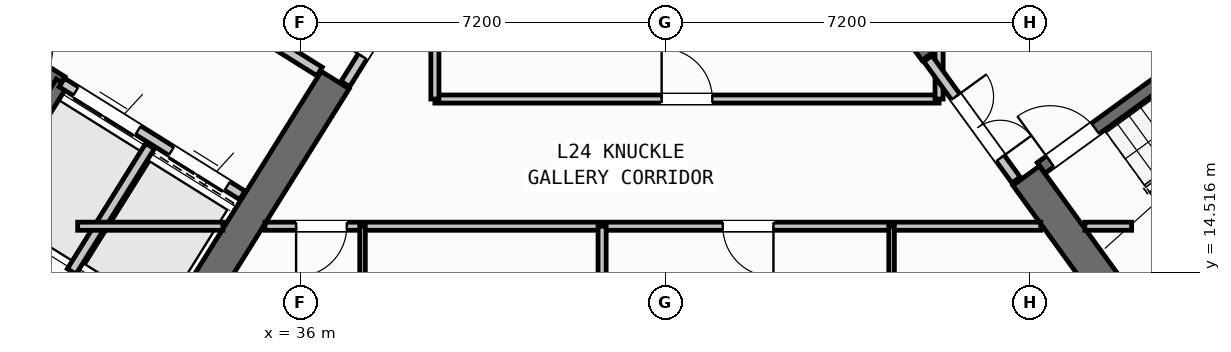
"""IFC4 building model, lengths in metres.
Left out: names, types, materials, properties, quantities, classifications, styles, units other than length and angle.
Written with IfcOpenShell. Run it as: python <this file> out.ifc"""

import sys

from ifc_helpers import new_model, si_unit, direction, frame, frame_2d, origin, place, context, subcontext, project, spatial, rectangle, extrude, source, transform, mapped, element, fill, save


model = new_model("IFC4")
c1 = context("Model", 3, precision=1e-05, world=origin(), true_north=direction((0.0, 1.0)))
c2 = subcontext(c1, "Body", "Model", "MODEL_VIEW")
j1 = project(units=[si_unit("LENGTHUNIT", "METRE"), si_unit("PLANEANGLEUNIT", "RADIAN")], contexts=[c1])
p1 = place(None, origin())
s1 = spatial("IfcSite", under=j1, at=p1, CompositionType="ELEMENT")
p2 = place(p1, origin())
s2 = spatial("IfcBuilding", under=s1, at=p2, CompositionType="ELEMENT")
p3 = place(p2, frame((0.0, 0.0, 97.2)))
s3 = spatial("IfcBuildingStorey", under=s2, at=p3, CompositionType="ELEMENT", Elevation=97.2)
p4 = place(p3, frame((33.409, 12.45, 0.0), z_axis=(0.0, 0.0, 1.0), x_axis=(-0.848051132073, 0.529914405721, 0.0)))
e1 = element("IfcWall", 1, at=p4, inside=s3, PredefinedType="SHEAR", context=c2, shape_type="SweptSolid", body=[
    extrude(rectangle(XDim=13.24, YDim=0.65, at=frame_2d((6.62, 0.0))), origin(), (0.0, 0.0, 1.0), 3.32),
])
p5 = place(p3, frame((36.683, 18.304, 0.0), z_axis=(0.0, 0.0, 1.0), x_axis=(-0.529899109053, -0.848060690178, 0.0)))
e2 = element("IfcWall", 2, at=p5, inside=s3, PredefinedType="SHEAR", context=c2, shape_type="SweptSolid", body=[
    extrude(rectangle(XDim=6.375, YDim=0.65, at=frame_2d((3.188, 0.0))), origin(), (0.0, 0.0, 1.0), 3.32),
])
p6 = place(p3, frame((52.318, 13.11, 0.0), z_axis=(0.0, 0.0, 1.0), x_axis=(0.809019445368, 0.587781878776, 0.0)))
e3 = element("IfcWall", 3, at=p6, inside=s3, PredefinedType="SHEAR", context=c2, shape_type="SweptSolid", body=[
    extrude(rectangle(XDim=12.44, YDim=0.65, at=frame_2d((6.22, 0.0))), origin(), (0.0, 0.0, 1.0), 3.32),
])
p7 = place(p3, frame((52.39, 13.564, 0.0), z_axis=(0.0, 0.0, 1.0), x_axis=(-0.58779688989, 0.809008539037, 0.0)))
e4 = element("IfcWall", 4, at=p7, inside=s3, PredefinedType="SHEAR", context=c2, shape_type="SweptSolid", body=[
    extrude(rectangle(XDim=3.525, YDim=0.65, at=frame_2d((1.763, 0.0))), origin(), (0.0, 0.0, 1.0), 3.32),
])
p8 = place(p3, frame((48.526, 18.884, 0.0), z_axis=(0.0, 0.0, 1.0), x_axis=(-0.58777996584, 0.809020835181, 0.0)))
e5 = element("IfcWall", 5, at=p8, inside=s3, PredefinedType="SHEAR", context=c2, shape_type="SweptSolid", body=[
    extrude(rectangle(XDim=6.375, YDim=0.65, at=frame_2d((3.188, 0.0))), origin(), (0.0, 0.0, 1.0), 3.32),
])
p9 = place(p3, frame((31.76, 12.183, 0.0), z_axis=(0.0, 0.0, 1.0), x_axis=(-0.848047074256, 0.529920899612, 0.0)))
e6 = element("IfcWall", 6, at=p9, inside=s3, PredefinedType="STANDARD", context=c2, shape_type="SweptSolid", body=[
    extrude(rectangle(XDim=30.652, YDim=0.32, at=frame_2d((15.326, 0.0))), origin(), (0.0, 0.0, 1.0), 3.32),
])
p10 = place(p9, frame((15.153, 0.0, 0.0)))
e7 = element("IfcOpeningElement", 7, at=p10, cuts=e6, PredefinedType="OPENING", context=c2, shape_type="SweptSolid", body=[
    extrude(rectangle(XDim=1.2, YDim=2.15, at=frame_2d((0.6, 1.075))), frame((0.0, 0.17, 0.0), z_axis=(0.0, -1.0, 0.0), x_axis=(1.0, 0.0, 0.0)), (0.0, 0.0, 1.0), 0.34),
])
p11 = place(p9, frame((2.002, 0.0, 0.8)))
e8 = element("IfcOpeningElement", 8, at=p11, cuts=e6, PredefinedType="OPENING", context=c2, shape_type="SweptSolid", body=[
    extrude(rectangle(XDim=2.1, YDim=1.55, at=frame_2d((1.05, 0.775))), frame((0.0, 0.17, 0.0), z_axis=(0.0, -1.0, 0.0), x_axis=(1.0, 0.0, 0.0)), (0.0, 0.0, 1.0), 0.34),
])
p12 = place(p9, frame((7.206, 0.0, 0.8)))
e9 = element("IfcOpeningElement", 9, at=p12, cuts=e6, PredefinedType="OPENING", context=c2, shape_type="SweptSolid", body=[
    extrude(rectangle(XDim=2.1, YDim=1.55, at=frame_2d((1.05, 0.775))), frame((0.0, 0.17, 0.0), z_axis=(0.0, -1.0, 0.0), x_axis=(1.0, 0.0, 0.0)), (0.0, 0.0, 1.0), 0.34),
])
p13 = place(p9, frame((12.648, 0.0, 1.0)))
e10 = element("IfcOpeningElement", 10, at=p13, cuts=e6, PredefinedType="OPENING", context=c2, shape_type="SweptSolid", body=[
    extrude(rectangle(XDim=0.9, YDim=1.25, at=frame_2d((0.45, 0.625))), frame((0.0, 0.17, 0.0), z_axis=(0.0, -1.0, 0.0), x_axis=(1.0, 0.0, 0.0)), (0.0, 0.0, 1.0), 0.34),
])
p14 = place(p9, frame((27.974, 0.0, 0.95)))
e11 = element("IfcOpeningElement", 11, at=p14, cuts=e6, PredefinedType="OPENING", context=c2, shape_type="SweptSolid", body=[
    extrude(rectangle(XDim=1.2, YDim=1.4, at=frame_2d((0.6, 0.7))), frame((0.0, 0.17, 0.0), z_axis=(0.0, -1.0, 0.0), x_axis=(1.0, 0.0, 0.0)), (0.0, 0.0, 1.0), 0.34),
])
p15 = place(p9, frame((18.347, 0.0, 1.0)))
e12 = element("IfcOpeningElement", 12, at=p15, cuts=e6, PredefinedType="OPENING", context=c2, shape_type="SweptSolid", body=[
    extrude(rectangle(XDim=0.9, YDim=1.25, at=frame_2d((0.45, 0.625))), frame((0.0, 0.17, 0.0), z_axis=(0.0, -1.0, 0.0), x_axis=(1.0, 0.0, 0.0)), (0.0, 0.0, 1.0), 0.34),
])
p16 = place(p9, frame((20.931, 0.0, 1.0)))
e13 = element("IfcOpeningElement", 13, at=p16, cuts=e6, PredefinedType="OPENING", context=c2, shape_type="SweptSolid", body=[
    extrude(rectangle(XDim=0.65, YDim=1.15, at=frame_2d((0.325, 0.575))), frame((0.0, 0.17, 0.0), z_axis=(0.0, -1.0, 0.0), x_axis=(1.0, 0.0, 0.0)), (0.0, 0.0, 1.0), 0.34),
])
p17 = place(p9, frame((22.938, 0.0, 1.0)))
e14 = element("IfcOpeningElement", 14, at=p17, cuts=e6, PredefinedType="OPENING", context=c2, shape_type="SweptSolid", body=[
    extrude(rectangle(XDim=0.9, YDim=1.25, at=frame_2d((0.45, 0.625))), frame((0.0, 0.17, 0.0), z_axis=(0.0, -1.0, 0.0), x_axis=(1.0, 0.0, 0.0)), (0.0, 0.0, 1.0), 0.34),
])
p18 = place(p9, frame((25.069, 0.0, 1.0)))
e15 = element("IfcOpeningElement", 15, at=p18, cuts=e6, PredefinedType="OPENING", context=c2, shape_type="SweptSolid", body=[
    extrude(rectangle(XDim=0.9, YDim=1.25, at=frame_2d((0.45, 0.625))), frame((0.0, 0.17, 0.0), z_axis=(0.0, -1.0, 0.0), x_axis=(1.0, 0.0, 0.0)), (0.0, 0.0, 1.0), 0.34),
])
p19 = place(p3, frame((31.28, 18.261, 0.0), z_axis=(0.0, 0.0, 1.0), x_axis=(-0.848051618787, 0.529913626805, 0.0)))
e16 = element("IfcWall", 16, at=p19, inside=s3, PredefinedType="SHEAR", context=c2, shape_type="SweptSolid", body=[
    extrude(rectangle(XDim=7.46, YDim=0.26, at=frame_2d((3.73, 0.0))), origin(), (0.0, 0.0, 1.0), 3.32),
])
p20 = place(p19, frame((0.36, 0.0, 0.0)))
e17 = element("IfcOpeningElement", 17, at=p20, cuts=e16, PredefinedType="OPENING", context=c2, shape_type="SweptSolid", body=[
    extrude(rectangle(XDim=0.86, YDim=2.05, at=frame_2d((0.43, 1.025))), frame((0.0, 0.14, 0.0), z_axis=(0.0, -1.0, 0.0), x_axis=(1.0, 0.0, 0.0)), (0.0, 0.0, 1.0), 0.28),
])
p21 = place(p3, frame((31.288, 18.256, 0.0), z_axis=(0.0, 0.0, 1.0), x_axis=(-0.529943379326, -0.848033026897, 0.0)))
e18 = element("IfcWall", 18, at=p21, inside=s3, PredefinedType="SHEAR", context=c2, shape_type="SweptSolid", body=[
    extrude(rectangle(XDim=3.16, YDim=0.26, at=frame_2d((1.58, 0.0))), origin(), (0.0, 0.0, 1.0), 3.32),
])
p22 = place(p3, frame((34.848, 16.031, 0.0), z_axis=(0.0, 0.0, 1.0), x_axis=(-0.848044042236, 0.529925751807, 0.0)))
e19 = element("IfcWall", 19, at=p22, inside=s3, PredefinedType="STANDARD", context=c2, shape_type="SweptSolid", body=[
    extrude(rectangle(XDim=4.198, YDim=0.2, at=frame_2d((2.099, 0.0))), origin(), (0.0, 0.0, 1.0), 3.31),
])
p23 = place(p22, frame((0.348, 0.0, 0.0)))
e20 = element("IfcOpeningElement", 20, at=p23, cuts=e19, PredefinedType="OPENING", context=c2, shape_type="SweptSolid", body=[
    extrude(rectangle(XDim=1.3, YDim=2.2, at=frame_2d((0.65, 1.1))), frame((0.0, 0.11, 0.0), z_axis=(0.0, -1.0, 0.0), x_axis=(1.0, 0.0, 0.0)), (0.0, 0.0, 1.0), 0.22),
])
p24 = place(p22, frame((2.423, 0.0, 0.0)))
e21 = element("IfcOpeningElement", 21, at=p24, cuts=e19, PredefinedType="OPENING", context=c2, shape_type="SweptSolid", body=[
    extrude(rectangle(XDim=1.45, YDim=2.25, at=frame_2d((0.725, 1.125))), frame((0.0, 0.11, 0.0), z_axis=(0.0, -1.0, 0.0), x_axis=(1.0, 0.0, 0.0)), (0.0, 0.0, 1.0), 0.22),
])
p25 = place(p3, frame((36.374, 18.474, 0.0), z_axis=(0.0, 0.0, 1.0), x_axis=(-0.848051071577, 0.529914502535, 0.0)))
e22 = element("IfcWall", 22, at=p25, inside=s3, PredefinedType="STANDARD", context=c2, shape_type="SweptSolid", body=[
    extrude(rectangle(XDim=5.718, YDim=0.2, at=frame_2d((2.859, 0.0))), origin(), (0.0, 0.0, 1.0), 3.31),
])
p26 = place(p25, frame((2.498, 0.0, 0.0)))
e23 = element("IfcOpeningElement", 23, at=p26, cuts=e22, PredefinedType="OPENING", context=c2, shape_type="SweptSolid", body=[
    extrude(rectangle(XDim=1.15, YDim=2.1, at=frame_2d((0.575, 1.05))), frame((0.0, 0.11, 0.0), z_axis=(0.0, -1.0, 0.0), x_axis=(1.0, 0.0, 0.0)), (0.0, 0.0, 1.0), 0.22),
])
p27 = place(p3, frame((33.029, 17.003, 0.0), z_axis=(0.0, 0.0, 1.0), x_axis=(-0.529916267533, -0.848049968695, 0.0)))
e24 = element("IfcWall", 24, at=p27, inside=s3, PredefinedType="STANDARD", context=c2, shape_type="SweptSolid", body=[
    extrude(rectangle(XDim=2.92, YDim=0.2, at=frame_2d((1.46, 0.0))), origin(), (0.0, 0.0, 1.0), 3.31),
])
p28 = place(p3, frame((52.472, 14.013, 0.0), z_axis=(0.0, 0.0, 1.0), x_axis=(0.809028366311, 0.587769599847, 0.0)))
e25 = element("IfcWall", 25, at=p28, inside=s3, PredefinedType="SHEAR", context=c2, shape_type="SweptSolid", body=[
    extrude(rectangle(XDim=7.33, YDim=0.26, at=frame_2d((3.665, 0.0))), origin(), (0.0, 0.0, 1.0), 3.32),
])
p29 = place(p3, frame((50.615, 16.57, 0.0), z_axis=(0.0, 0.0, 1.0), x_axis=(0.809028366311, 0.587769599847, 0.0)))
e26 = element("IfcWall", 26, at=p29, inside=s3, PredefinedType="SHEAR", context=c2, shape_type="SweptSolid", body=[
    extrude(rectangle(XDim=7.33, YDim=0.26, at=frame_2d((3.665, 0.0))), origin(), (0.0, 0.0, 1.0), 3.32),
])
p30 = place(p29, frame((0.22, 0.0, 0.0)))
e27 = element("IfcOpeningElement", 27, at=p30, cuts=e26, PredefinedType="OPENING", context=c2, shape_type="SweptSolid", body=[
    extrude(rectangle(XDim=1.1, YDim=2.1, at=frame_2d((0.55, 1.05))), frame((0.0, 0.14, 0.0), z_axis=(0.0, -1.0, 0.0), x_axis=(1.0, 0.0, 0.0)), (0.0, 0.0, 1.0), 0.28),
])
p31 = place(p3, frame((38.451, 20.737, 0.0), z_axis=(0.0, 0.0, 1.0), x_axis=(-0.529924799939, -0.848044637038, 0.0)))
e28 = element("IfcWall", 28, at=p31, inside=s3, PredefinedType="STANDARD", context=c2, shape_type="SweptSolid", body=[
    extrude(rectangle(XDim=2.96, YDim=0.2, at=frame_2d((1.48, 0.0))), origin(), (0.0, 0.0, 1.0), 3.31),
])
p32 = place(p31, frame((1.46, 0.0, 0.0)))
e29 = element("IfcOpeningElement", 29, at=p32, cuts=e28, PredefinedType="OPENING", context=c2, shape_type="SweptSolid", body=[
    extrude(rectangle(XDim=0.86, YDim=2.05, at=frame_2d((0.43, 1.025))), frame((0.0, 0.11, 0.0), z_axis=(0.0, -1.0, 0.0), x_axis=(1.0, 0.0, 0.0)), (0.0, 0.0, 1.0), 0.22),
])
p33 = place(p3, frame((31.6, 15.42, 0.0), z_axis=(0.0, 0.0, 1.0), x_axis=(1.0, 0.0, 0.0)))
e30 = element("IfcWall", 30, at=p33, inside=s3, PredefinedType="PARTITIONING", context=c2, shape_type="SweptSolid", body=[
    extrude(rectangle(XDim=2.866, YDim=0.16, at=frame_2d((1.433, 0.0))), origin(), (0.0, 0.0, 1.0), 3.31),
])
p34 = place(p3, frame((35.296, 15.42, 0.0), z_axis=(0.0, 0.0, 1.0), x_axis=(1.0, 0.0, 0.0)))
e31 = element("IfcWall", 31, at=p34, inside=s3, PredefinedType="PARTITIONING", context=c2, shape_type="SweptSolid", body=[
    extrude(rectangle(XDim=15.311, YDim=0.16, at=frame_2d((7.655, 0.0))), origin(), (0.0, 0.0, 1.0), 3.31),
])
p35 = place(p34, frame((0.615, 0.0, 0.0)))
e32 = element("IfcOpeningElement", 32, at=p35, cuts=e31, PredefinedType="OPENING", context=c2, shape_type="SweptSolid", body=[
    extrude(rectangle(XDim=1.0, YDim=2.1, at=frame_2d((0.5, 1.05))), frame((0.0, 0.09, 0.0), z_axis=(0.0, -1.0, 0.0), x_axis=(1.0, 0.0, 0.0)), (0.0, 0.0, 1.0), 0.18),
])
p36 = place(p34, frame((9.035, 0.0, 0.0)))
e33 = element("IfcOpeningElement", 33, at=p36, cuts=e31, PredefinedType="OPENING", context=c2, shape_type="SweptSolid", body=[
    extrude(rectangle(XDim=1.0, YDim=2.1, at=frame_2d((0.5, 1.05))), frame((0.0, 0.09, 0.0), z_axis=(0.0, -1.0, 0.0), x_axis=(1.0, 0.0, 0.0)), (0.0, 0.0, 1.0), 0.18),
])
p37 = place(p3, frame((51.477, 15.42, 0.0), z_axis=(0.0, 0.0, 1.0), x_axis=(1.0, 0.0, 0.0)))
e34 = element("IfcWall", 34, at=p37, inside=s3, PredefinedType="PARTITIONING", context=c2, shape_type="SweptSolid", body=[
    extrude(rectangle(XDim=0.923, YDim=0.16, at=frame_2d((0.461, 0.0))), origin(), (0.0, 0.0, 1.0), 3.31),
])
p38 = place(p3, frame((38.65, 17.93, 0.0), z_axis=(0.0, 0.0, 1.0), x_axis=(1.0, 0.0, 0.0)))
e35 = element("IfcWall", 35, at=p38, inside=s3, PredefinedType="PARTITIONING", context=c2, shape_type="SweptSolid", body=[
    extrude(rectangle(XDim=9.95, YDim=0.16, at=frame_2d((4.975, 0.0))), origin(), (0.0, 0.0, 1.0), 3.31),
])
p39 = place(p38, frame((4.475, 0.0, 0.0)))
e36 = element("IfcOpeningElement", 36, at=p39, cuts=e35, PredefinedType="OPENING", context=c2, shape_type="SweptSolid", body=[
    extrude(rectangle(XDim=1.0, YDim=2.1, at=frame_2d((0.5, 1.05))), frame((0.0, 0.09, 0.0), z_axis=(0.0, -1.0, 0.0), x_axis=(1.0, 0.0, 0.0)), (0.0, 0.0, 1.0), 0.18),
])
p40 = place(p3, frame((38.65, 17.93, 0.0), z_axis=(0.0, 0.0, 1.0), x_axis=(0.0, 1.0, 0.0)))
e37 = element("IfcWall", 37, at=p40, inside=s3, PredefinedType="PARTITIONING", context=c2, shape_type="SweptSolid", body=[
    extrude(rectangle(XDim=2.857, YDim=0.16, at=frame_2d((1.428, 0.0))), origin(), (0.0, 0.0, 1.0), 3.31),
])
p41 = place(p3, frame((48.6, 17.93, 0.0), z_axis=(0.0, 0.0, 1.0), x_axis=(0.0, 1.0, 0.0)))
e38 = element("IfcWall", 38, at=p41, inside=s3, PredefinedType="PARTITIONING", context=c2, shape_type="SweptSolid", body=[
    extrude(rectangle(XDim=0.993, YDim=0.16, at=frame_2d((0.496, 0.0))), origin(), (0.0, 0.0, 1.0), 3.31),
])
p42 = place(p3, frame((50.119, 16.333, 0.0), z_axis=(0.0, 0.0, 1.0), x_axis=(-0.587749856981, 0.809042709391, 0.0)))
e39 = element("IfcWall", 39, at=p42, inside=s3, PredefinedType="STANDARD", context=c2, shape_type="SweptSolid", body=[
    extrude(rectangle(XDim=2.96, YDim=0.2, at=frame_2d((1.48, 0.0))), origin(), (0.0, 0.0, 1.0), 3.31),
])
p43 = place(p42, frame((0.53, 0.0, 0.0)))
e40 = element("IfcOpeningElement", 40, at=p43, cuts=e39, PredefinedType="OPENING", context=c2, shape_type="SweptSolid", body=[
    extrude(rectangle(XDim=1.5, YDim=2.15, at=frame_2d((0.75, 1.075))), frame((0.0, 0.11, 0.0), z_axis=(0.0, -1.0, 0.0), x_axis=(1.0, 0.0, 0.0)), (0.0, 0.0, 1.0), 0.22),
])
p44 = place(p3, frame((41.95, 1.96, 0.0), z_axis=(0.0, 0.0, 1.0), x_axis=(0.0, 1.0, 0.0)))
e41 = element("IfcWall", 41, at=p44, inside=s3, PredefinedType="PARTITIONING", context=c2, shape_type="SweptSolid", body=[
    extrude(rectangle(XDim=13.46, YDim=0.16, at=frame_2d((6.73, 0.0))), origin(), (0.0, 0.0, 1.0), 3.31),
])
p45 = place(p3, frame((37.222, 1.96, 0.0), z_axis=(0.0, 0.0, 1.0), x_axis=(0.0, 1.0, 0.0)))
e42 = element("IfcWall", 42, at=p45, inside=s3, PredefinedType="PARTITIONING", context=c2, shape_type="SweptSolid", body=[
    extrude(rectangle(XDim=13.46, YDim=0.11, at=frame_2d((6.73, 0.0))), origin(), (0.0, 0.0, 1.0), 3.31),
])
p46 = place(p45, frame((5.2, 0.0, 0.0)))
e43 = element("IfcOpeningElement", 43, at=p46, cuts=e42, PredefinedType="OPENING", context=c2, shape_type="SweptSolid", body=[
    extrude(rectangle(XDim=0.92, YDim=2.08, at=frame_2d((0.46, 1.04))), frame((0.0, 0.065, 0.0), z_axis=(0.0, -1.0, 0.0), x_axis=(1.0, 0.0, 0.0)), (0.0, 0.0, 1.0), 0.13),
])
p47 = place(p45, frame((10.89, 0.0, 0.0)))
e44 = element("IfcOpeningElement", 44, at=p47, cuts=e42, PredefinedType="OPENING", context=c2, shape_type="SweptSolid", body=[
    extrude(rectangle(XDim=0.88, YDim=2.08, at=frame_2d((0.44, 1.04))), frame((0.0, 0.065, 0.0), z_axis=(0.0, -1.0, 0.0), x_axis=(1.0, 0.0, 0.0)), (0.0, 0.0, 1.0), 0.13),
])
p48 = place(p3, frame((47.663, 1.96, 0.0), z_axis=(0.0, 0.0, 1.0), x_axis=(0.0, 1.0, 0.0)))
e45 = element("IfcWall", 45, at=p48, inside=s3, PredefinedType="PARTITIONING", context=c2, shape_type="SweptSolid", body=[
    extrude(rectangle(XDim=13.46, YDim=0.11, at=frame_2d((6.73, 0.0))), origin(), (0.0, 0.0, 1.0), 3.31),
])
p49 = place(p48, frame((6.3, 0.0, 0.0)))
e46 = element("IfcOpeningElement", 46, at=p49, cuts=e45, PredefinedType="OPENING", context=c2, shape_type="SweptSolid", body=[
    extrude(rectangle(XDim=0.92, YDim=2.08, at=frame_2d((0.46, 1.04))), frame((0.0, 0.065, 0.0), z_axis=(0.0, -1.0, 0.0), x_axis=(1.0, 0.0, 0.0)), (0.0, 0.0, 1.0), 0.13),
])
p50 = place(p48, frame((11.54, 0.0, 0.0)))
e47 = element("IfcOpeningElement", 47, at=p50, cuts=e45, PredefinedType="OPENING", context=c2, shape_type="SweptSolid", body=[
    extrude(rectangle(XDim=0.88, YDim=2.08, at=frame_2d((0.44, 1.04))), frame((0.0, 0.065, 0.0), z_axis=(0.0, -1.0, 0.0), x_axis=(1.0, 0.0, 0.0)), (0.0, 0.0, 1.0), 0.13),
])
m1 = source(origin(), c2, "Body", "SweptSolid", [
    extrude(rectangle(XDim=1.3, YDim=2.2, at=frame_2d((0.65, 1.1))), frame((0.0, 0.025, 0.0), z_axis=(0.0, -1.0, 0.0), x_axis=(1.0, 0.0, 0.0)), (0.0, 0.0, 1.0), 0.05),
])
p51 = place(p23, origin())
e48 = element("IfcDoor", 48, at=p51, inside=s3, OperationType="DOUBLE_DOOR_SLIDING", PredefinedType="DOOR", context=c2, shape_type="MappedRepresentation", body=[
    mapped(m1, transform((0.0, 0.0, 0.0), scale=1.0)),
])
fill(e20, e48)
m2 = source(origin(), c2, "Body", "SweptSolid", [
    extrude(rectangle(XDim=1.45, YDim=2.25, at=frame_2d((0.725, 1.125))), frame((0.0, 0.025, 0.0), z_axis=(0.0, -1.0, 0.0), x_axis=(1.0, 0.0, 0.0)), (0.0, 0.0, 1.0), 0.05),
])
p52 = place(p24, origin())
e49 = element("IfcDoor", 49, at=p52, inside=s3, OperationType="DOUBLE_DOOR_SLIDING", PredefinedType="DOOR", context=c2, shape_type="MappedRepresentation", body=[
    mapped(m2, transform((0.0, 0.0, 0.0), scale=1.0)),
])
fill(e21, e49)
m3 = source(origin(), c2, "Body", "SweptSolid", [
    extrude(rectangle(XDim=1.1, YDim=2.1, at=frame_2d((0.55, 1.05))), frame((0.0, 0.025, 0.0), z_axis=(0.0, -1.0, 0.0), x_axis=(1.0, 0.0, 0.0)), (0.0, 0.0, 1.0), 0.05),
])
p53 = place(p30, origin())
e50 = element("IfcDoor", 50, at=p53, inside=s3, OperationType="SINGLE_SWING_LEFT", PredefinedType="DOOR", context=c2, shape_type="MappedRepresentation", body=[
    mapped(m3, transform((0.0, 0.0, 0.0), scale=1.0)),
])
fill(e27, e50)
m4 = source(origin(), c2, "Body", "SweptSolid", [
    extrude(rectangle(XDim=1.0, YDim=2.1, at=frame_2d((0.5, 1.05))), frame((0.0, 0.025, 0.0), z_axis=(0.0, -1.0, 0.0), x_axis=(1.0, 0.0, 0.0)), (0.0, 0.0, 1.0), 0.05),
])
p54 = place(p39, origin())
e51 = element("IfcDoor", 51, at=p54, inside=s3, OperationType="SINGLE_SWING_LEFT", PredefinedType="DOOR", context=c2, shape_type="MappedRepresentation", body=[
    mapped(m4, transform((0.0, 0.0, 0.0), scale=1.0)),
])
fill(e36, e51)
m5 = source(origin(), c2, "Body", "SweptSolid", [
    extrude(rectangle(XDim=0.86, YDim=2.05, at=frame_2d((0.43, 1.025))), frame((0.0, 0.025, 0.0), z_axis=(0.0, -1.0, 0.0), x_axis=(1.0, 0.0, 0.0)), (0.0, 0.0, 1.0), 0.05),
])
p55 = place(p32, frame((0.86, 0.0, 0.0), z_axis=(0.0, 0.0, 1.0), x_axis=(-1.0, 0.0, 0.0)))
e52 = element("IfcDoor", 52, at=p55, inside=s3, OperationType="SINGLE_SWING_LEFT", PredefinedType="DOOR", context=c2, shape_type="MappedRepresentation", body=[
    mapped(m5, transform((0.0, 0.0, 0.0), scale=1.0)),
])
fill(e29, e52)
m6 = source(origin(), c2, "Body", "SweptSolid", [
    extrude(rectangle(XDim=1.5, YDim=2.15, at=frame_2d((0.75, 1.075))), frame((0.0, 0.025, 0.0), z_axis=(0.0, -1.0, 0.0), x_axis=(1.0, 0.0, 0.0)), (0.0, 0.0, 1.0), 0.05),
])
p56 = place(p43, frame((1.5, 0.0, 0.0), z_axis=(0.0, 0.0, 1.0), x_axis=(-1.0, 0.0, 0.0)))
e53 = element("IfcDoor", 53, at=p56, inside=s3, OperationType="DOUBLE_DOOR_SINGLE_SWING", PredefinedType="DOOR", context=c2, shape_type="MappedRepresentation", body=[
    mapped(m6, transform((0.0, 0.0, 0.0), scale=1.0)),
])
fill(e40, e53)
p57 = place(p35, frame((1.0, 0.0, 0.0), z_axis=(0.0, 0.0, 1.0), x_axis=(-1.0, 0.0, 0.0)))
e54 = element("IfcDoor", 54, at=p57, inside=s3, OperationType="SINGLE_SWING_RIGHT", PredefinedType="DOOR", context=c2, shape_type="MappedRepresentation", body=[
    mapped(m4, transform((0.0, 0.0, 0.0), scale=1.0)),
])
fill(e32, e54)
p58 = place(p36, frame((1.0, 0.0, 0.0), z_axis=(0.0, 0.0, 1.0), x_axis=(-1.0, 0.0, 0.0)))
e55 = element("IfcDoor", 55, at=p58, inside=s3, OperationType="SINGLE_SWING_LEFT", PredefinedType="DOOR", context=c2, shape_type="MappedRepresentation", body=[
    mapped(m4, transform((0.0, 0.0, 0.0), scale=1.0)),
])
fill(e33, e55)
save(model, sys.argv[1])
